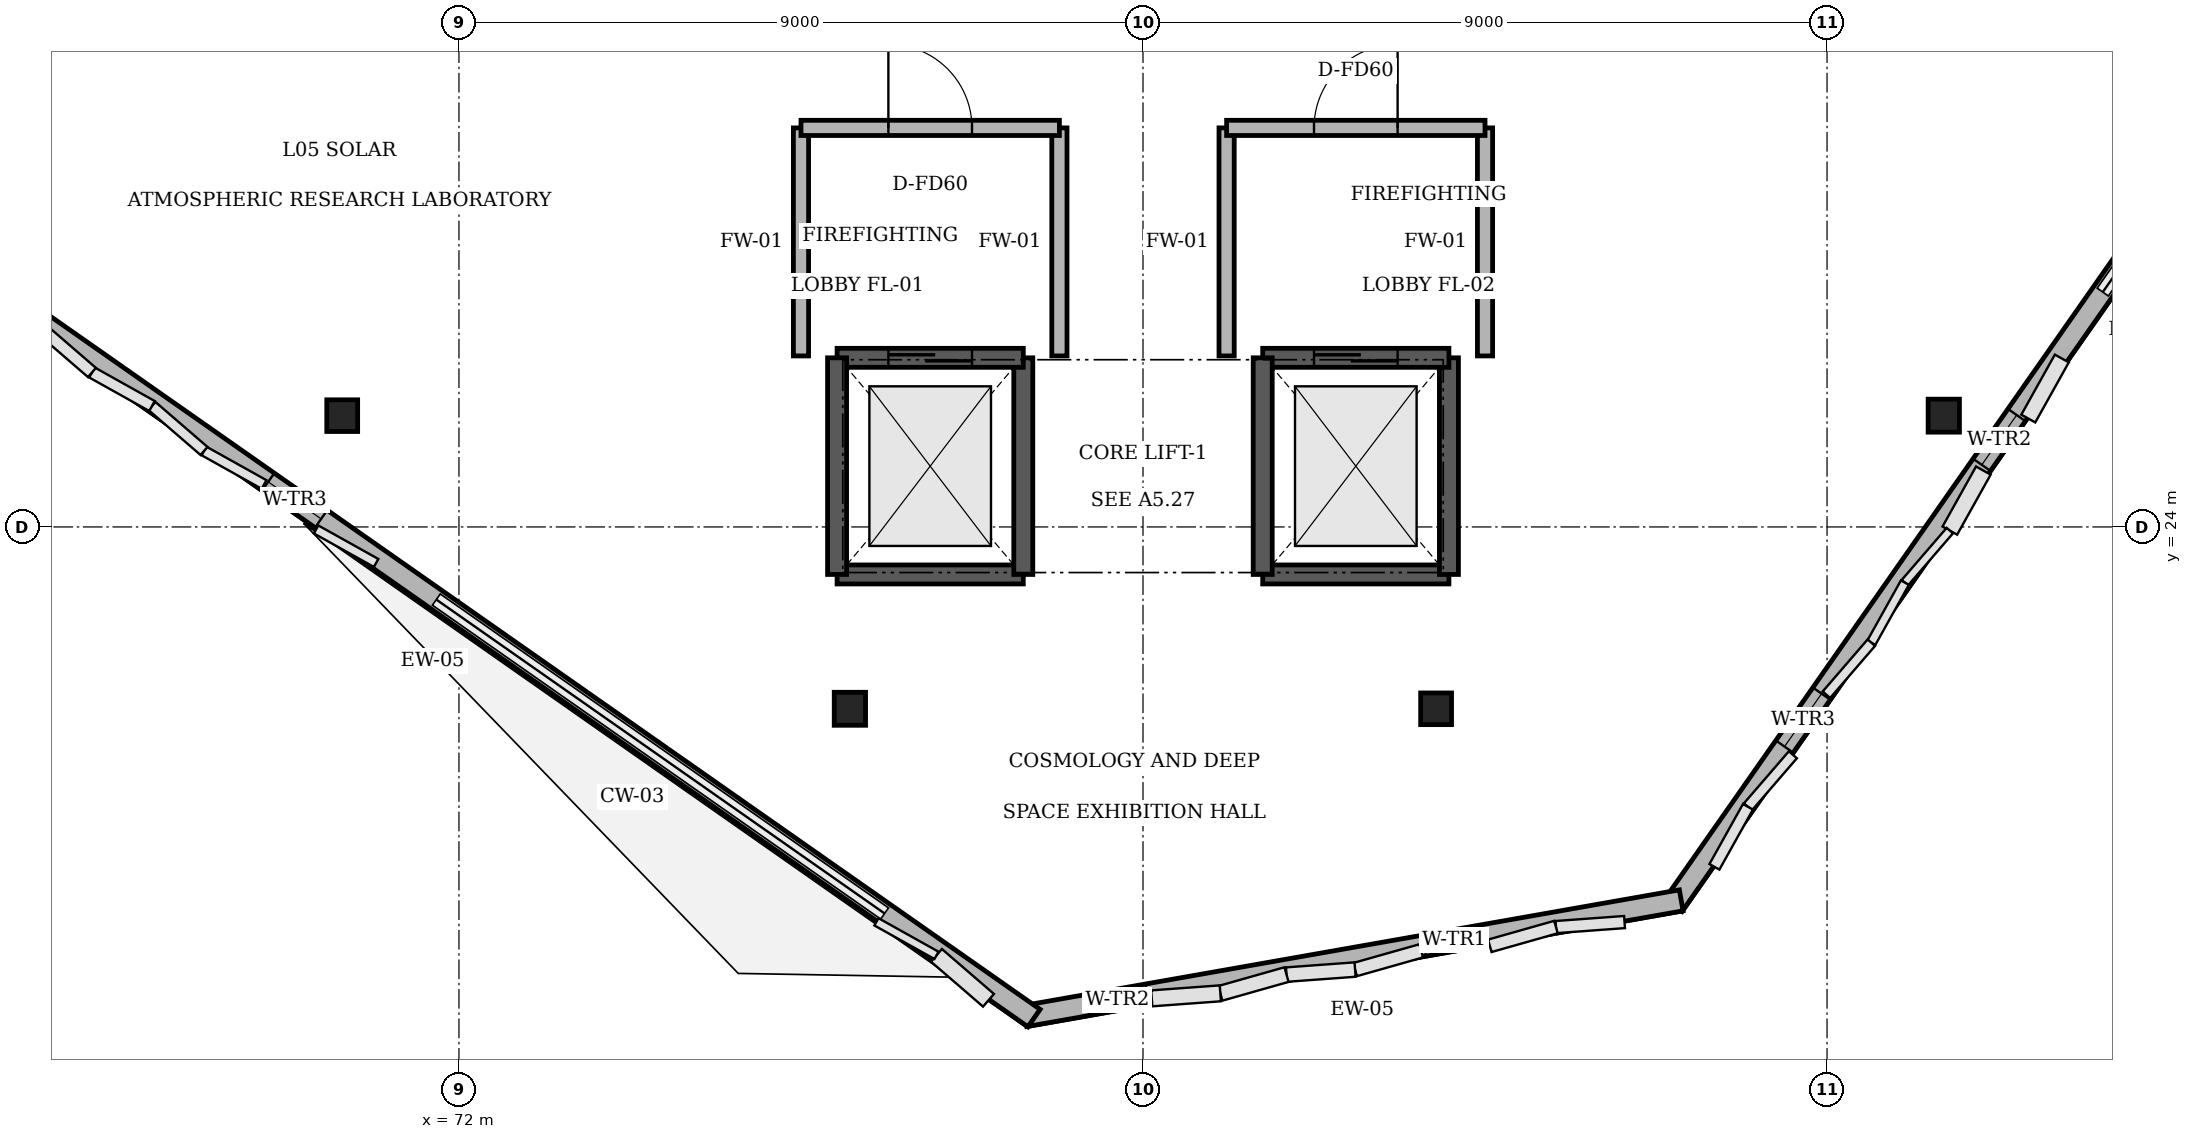
"""IFC4 building model, lengths in metres.
Left out: names, types, materials, properties, quantities, classifications, styles, units other than length and angle.
Written with IfcOpenShell. Run it as: python <this file> out.ifc"""

import sys

from ifc_helpers import new_model, si_unit, direction, frame, frame_2d, origin, origin_2d, place, context, subcontext, project, spatial, rectangle, i_section, extrude, element, fill, save


model = new_model("IFC4")
c1 = context("Model", 3, precision=1e-05, world=origin(), true_north=direction((0.0, 1.0)))
c2 = subcontext(c1, "Body", "Model", "MODEL_VIEW")
j1 = project(units=[si_unit("LENGTHUNIT", "METRE"), si_unit("PLANEANGLEUNIT", "RADIAN")], contexts=[c1])
p1 = place(None, origin())
s1 = spatial("IfcSite", under=j1, at=p1, CompositionType="ELEMENT")
p2 = place(p1, origin())
s2 = spatial("IfcBuilding", under=s1, at=p2, CompositionType="ELEMENT")
p3 = place(p2, frame((0.0, 0.0, 25.2)))
s3 = spatial("IfcBuildingStorey", under=s2, at=p3, CompositionType="ELEMENT", Elevation=25.2)
p4 = place(p3, frame((70.464, 25.464, 0.0), z_axis=(0.0, 0.0, 1.0), x_axis=(1.0, 0.0, 0.0)))
e1 = element("IfcColumn", 1, at=p4, inside=s3, PredefinedType="COLUMN", context=c2, shape_type="SweptSolid", body=[
    extrude(i_section(OverallWidth=0.406, OverallDepth=0.417, WebThickness=0.03, FlangeThickness=0.044, FilletRadius=0.015, at=origin_2d()), origin(), (0.0, 0.0, 1.0), 5.55),
])
p5 = place(p3, frame((77.144, 21.608, 0.0), z_axis=(0.0, 0.0, 1.0), x_axis=(1.0, 0.0, 0.0)))
e2 = element("IfcColumn", 2, at=p5, inside=s3, PredefinedType="COLUMN", context=c2, shape_type="SweptSolid", body=[
    extrude(i_section(OverallWidth=0.412, OverallDepth=0.434, WebThickness=0.036, FlangeThickness=0.044, FilletRadius=0.015, at=origin_2d()), origin(), (0.0, 0.0, 1.0), 5.55),
])
p6 = place(p3, frame((84.856, 21.608, 0.0), z_axis=(0.0, 0.0, 1.0), x_axis=(1.0, 0.0, 0.0)))
e3 = element("IfcColumn", 3, at=p6, inside=s3, PredefinedType="COLUMN", context=c2, shape_type="SweptSolid", body=[
    extrude(i_section(OverallWidth=0.406, OverallDepth=0.417, WebThickness=0.03, FlangeThickness=0.044, FilletRadius=0.015, at=origin_2d()), origin(), (0.0, 0.0, 1.0), 5.55),
])
p7 = place(p3, frame((91.536, 25.464, 0.0), z_axis=(0.0, 0.0, 1.0), x_axis=(1.0, 0.0, 0.0)))
e4 = element("IfcColumn", 4, at=p7, inside=s3, PredefinedType="COLUMN", context=c2, shape_type="SweptSolid", body=[
    extrude(i_section(OverallWidth=0.412, OverallDepth=0.434, WebThickness=0.036, FlangeThickness=0.044, FilletRadius=0.015, at=origin_2d()), origin(), (0.0, 0.0, 1.0), 5.55),
])
p8 = place(p3, frame((99.134, 34.954, 0.0), z_axis=(0.0, 0.0, 1.0), x_axis=(-0.573571854902, -0.819155252235, 0.0)))
e5 = element("IfcWall", 5, at=p8, inside=s3, PredefinedType="SOLIDWALL", context=c2, shape_type="SweptSolid", body=[
    extrude(rectangle(XDim=19.45, YDim=0.28, at=frame_2d((9.725, 0.0))), origin(), (0.0, 0.0, 1.0), 2.45),
])
p9 = place(p8, frame((11.575, 0.0, 0.6)))
e6 = element("IfcOpeningElement", 6, at=p9, cuts=e5, PredefinedType="OPENING", context=c2, shape_type="SweptSolid", body=[
    extrude(rectangle(XDim=0.8, YDim=1.7, at=frame_2d((0.4, 0.85))), frame((0.0, 0.15, 0.0), z_axis=(0.0, -1.0, 0.0), x_axis=(1.0, 0.0, 0.0)), (0.0, 0.0, 1.0), 0.3),
])
p10 = place(p8, frame((16.05, 0.0, 0.6)))
e7 = element("IfcOpeningElement", 7, at=p10, cuts=e5, PredefinedType="OPENING", context=c2, shape_type="SweptSolid", body=[
    extrude(rectangle(XDim=0.85, YDim=1.6, at=frame_2d((0.425, 0.8))), frame((0.0, 0.15, 0.0), z_axis=(0.0, -1.0, 0.0), x_axis=(1.0, 0.0, 0.0)), (0.0, 0.0, 1.0), 0.3),
])
p11 = place(p3, frame((88.081, 19.087, 0.0), z_axis=(0.0, 0.0, 1.0), x_axis=(-0.98480457515, -0.173666199254, 0.0)))
e8 = element("IfcWall", 8, at=p11, inside=s3, PredefinedType="SOLIDWALL", context=c2, shape_type="SweptSolid", body=[
    extrude(rectangle(XDim=8.768, YDim=0.28, at=frame_2d((4.384, 0.0))), origin(), (0.0, 0.0, 1.0), 4.14),
])
p12 = place(p11, frame((2.634, 0.0, 1.05)))
e9 = element("IfcOpeningElement", 9, at=p12, cuts=e8, PredefinedType="OPENING", context=c2, shape_type="SweptSolid", body=[
    extrude(rectangle(XDim=0.8, YDim=1.5, at=frame_2d((0.4, 0.75))), frame((0.0, 0.15, 0.0), z_axis=(0.0, -1.0, 0.0), x_axis=(1.0, 0.0, 0.0)), (0.0, 0.0, 1.0), 0.3),
])
p13 = place(p11, frame((7.134, 0.0, 1.05)))
e10 = element("IfcOpeningElement", 10, at=p13, cuts=e8, PredefinedType="OPENING", context=c2, shape_type="SweptSolid", body=[
    extrude(rectangle(XDim=0.8, YDim=1.7, at=frame_2d((0.4, 0.85))), frame((0.0, 0.15, 0.0), z_axis=(0.0, -1.0, 0.0), x_axis=(1.0, 0.0, 0.0)), (0.0, 0.0, 1.0), 0.3),
])
p14 = place(p3, frame((79.566, 17.538, 0.0), z_axis=(0.0, 0.0, 1.0), x_axis=(-0.819152531377, 0.573575740717, 0.0)))
e11 = element("IfcWall", 11, at=p14, inside=s3, PredefinedType="SOLIDWALL", context=c2, shape_type="SweptSolid", body=[
    extrude(rectangle(XDim=18.35, YDim=0.28, at=frame_2d((9.175, 0.0))), origin(), (0.0, 0.0, 1.0), 2.45),
])
p15 = place(p14, frame((11.45, 0.0, 0.6)))
e12 = element("IfcOpeningElement", 12, at=p15, cuts=e11, PredefinedType="OPENING", context=c2, shape_type="SweptSolid", body=[
    extrude(rectangle(XDim=0.85, YDim=1.6, at=frame_2d((0.425, 0.8))), frame((0.0, 0.15, 0.0), z_axis=(0.0, -1.0, 0.0), x_axis=(1.0, 0.0, 0.0)), (0.0, 0.0, 1.0), 0.3),
])
p16 = place(p14, frame((15.975, 0.0, 0.6)))
e13 = element("IfcOpeningElement", 13, at=p16, cuts=e11, PredefinedType="OPENING", context=c2, shape_type="SweptSolid", body=[
    extrude(rectangle(XDim=0.8, YDim=1.5, at=frame_2d((0.4, 0.75))), frame((0.0, 0.15, 0.0), z_axis=(0.0, -1.0, 0.0), x_axis=(1.0, 0.0, 0.0)), (0.0, 0.0, 1.0), 0.3),
])
p17 = place(p3, frame((76.975, 23.375, 0.0), z_axis=(0.0, 0.0, 1.0), x_axis=(1.0, 0.0, 0.0)))
e14 = element("IfcWall", 14, at=p17, inside=s3, PredefinedType="SOLIDWALL", context=c2, shape_type="SweptSolid", body=[
    extrude(rectangle(XDim=2.45, YDim=0.25, at=frame_2d((1.225, 0.0))), origin(), (0.0, 0.0, 1.0), 4.8),
])
p18 = place(p3, frame((79.425, 23.375, 0.0), z_axis=(0.0, 0.0, 1.0), x_axis=(0.0, 1.0, 0.0)))
e15 = element("IfcWall", 15, at=p18, inside=s3, PredefinedType="SOLIDWALL", context=c2, shape_type="SweptSolid", body=[
    extrude(rectangle(XDim=2.85, YDim=0.25, at=frame_2d((1.425, 0.0))), origin(), (0.0, 0.0, 1.0), 4.8),
])
p19 = place(p3, frame((79.425, 26.225, 0.0), z_axis=(0.0, 0.0, 1.0), x_axis=(-1.0, 0.0, 0.0)))
e16 = element("IfcWall", 16, at=p19, inside=s3, PredefinedType="SOLIDWALL", context=c2, shape_type="SweptSolid", body=[
    extrude(rectangle(XDim=2.45, YDim=0.25, at=frame_2d((1.225, 0.0))), origin(), (0.0, 0.0, 1.0), 4.8),
])
p20 = place(p19, frame((0.675, 0.0, 0.0)))
e17 = element("IfcOpeningElement", 17, at=p20, cuts=e16, PredefinedType="OPENING", context=c2, shape_type="SweptSolid", body=[
    extrude(rectangle(XDim=1.1, YDim=2.2, at=frame_2d((0.55, 1.1))), frame((0.0, 0.135, 0.0), z_axis=(0.0, -1.0, 0.0), x_axis=(1.0, 0.0, 0.0)), (0.0, 0.0, 1.0), 0.27),
])
p21 = place(p3, frame((76.975, 26.225, 0.0), z_axis=(0.0, 0.0, 1.0), x_axis=(0.0, -1.0, 0.0)))
e18 = element("IfcWall", 18, at=p21, inside=s3, PredefinedType="SOLIDWALL", context=c2, shape_type="SweptSolid", body=[
    extrude(rectangle(XDim=2.85, YDim=0.25, at=frame_2d((1.425, 0.0))), origin(), (0.0, 0.0, 1.0), 4.8),
])
for number, where, z_axis, x_axis in (
    (19, (76.5, 26.25, 0.0), (0.0, 0.0, 1.0), (0.0, 1.0, 0.0)),
    (20, (79.9, 26.25, 0.0), (0.0, 0.0, 1.0), (0.0, 1.0, 0.0)),
):
    element("IfcWall", number, at=place(p3, frame(where, z_axis=z_axis, x_axis=x_axis)), inside=s3, PredefinedType="SOLIDWALL", context=c2, shape_type="SweptSolid", body=[
        extrude(rectangle(XDim=3.0, YDim=0.2, at=frame_2d((1.5, 0.0))), origin(), (0.0, 0.0, 1.0), 4.01),
    ])
p22 = place(p3, frame((76.5, 29.25, 0.0), z_axis=(0.0, 0.0, 1.0), x_axis=(1.0, 0.0, 0.0)))
e21 = element("IfcWall", 21, at=p22, inside=s3, PredefinedType="SOLIDWALL", context=c2, shape_type="SweptSolid", body=[
    extrude(rectangle(XDim=3.4, YDim=0.2, at=frame_2d((1.7, 0.0))), origin(), (0.0, 0.0, 1.0), 4.01),
])
p23 = place(p22, frame((1.15, 0.0, 0.0)))
e22 = element("IfcOpeningElement", 22, at=p23, cuts=e21, PredefinedType="OPENING", context=c2, shape_type="SweptSolid", body=[
    extrude(rectangle(XDim=1.1, YDim=2.2, at=frame_2d((0.55, 1.1))), frame((0.0, 0.11, 0.0), z_axis=(0.0, -1.0, 0.0), x_axis=(1.0, 0.0, 0.0)), (0.0, 0.0, 1.0), 0.22),
])
p24 = place(p3, frame((82.575, 23.375, 0.0), z_axis=(0.0, 0.0, 1.0), x_axis=(1.0, 0.0, 0.0)))
e23 = element("IfcWall", 23, at=p24, inside=s3, PredefinedType="SOLIDWALL", context=c2, shape_type="SweptSolid", body=[
    extrude(rectangle(XDim=2.45, YDim=0.25, at=frame_2d((1.225, 0.0))), origin(), (0.0, 0.0, 1.0), 4.8),
])
p25 = place(p3, frame((85.025, 23.375, 0.0), z_axis=(0.0, 0.0, 1.0), x_axis=(0.0, 1.0, 0.0)))
e24 = element("IfcWall", 24, at=p25, inside=s3, PredefinedType="SOLIDWALL", context=c2, shape_type="SweptSolid", body=[
    extrude(rectangle(XDim=2.85, YDim=0.25, at=frame_2d((1.425, 0.0))), origin(), (0.0, 0.0, 1.0), 4.8),
])
p26 = place(p3, frame((85.025, 26.225, 0.0), z_axis=(0.0, 0.0, 1.0), x_axis=(-1.0, 0.0, 0.0)))
e25 = element("IfcWall", 25, at=p26, inside=s3, PredefinedType="SOLIDWALL", context=c2, shape_type="SweptSolid", body=[
    extrude(rectangle(XDim=2.45, YDim=0.25, at=frame_2d((1.225, 0.0))), origin(), (0.0, 0.0, 1.0), 4.8),
])
p27 = place(p26, frame((0.675, 0.0, 0.0)))
e26 = element("IfcOpeningElement", 26, at=p27, cuts=e25, PredefinedType="OPENING", context=c2, shape_type="SweptSolid", body=[
    extrude(rectangle(XDim=1.1, YDim=2.2, at=frame_2d((0.55, 1.1))), frame((0.0, 0.135, 0.0), z_axis=(0.0, -1.0, 0.0), x_axis=(1.0, 0.0, 0.0)), (0.0, 0.0, 1.0), 0.27),
])
p28 = place(p3, frame((82.575, 26.225, 0.0), z_axis=(0.0, 0.0, 1.0), x_axis=(0.0, -1.0, 0.0)))
e27 = element("IfcWall", 27, at=p28, inside=s3, PredefinedType="SOLIDWALL", context=c2, shape_type="SweptSolid", body=[
    extrude(rectangle(XDim=2.85, YDim=0.25, at=frame_2d((1.425, 0.0))), origin(), (0.0, 0.0, 1.0), 4.8),
])
for number, where, z_axis, x_axis in (
    (28, (82.1, 26.25, 0.0), (0.0, 0.0, 1.0), (0.0, 1.0, 0.0)),
    (29, (85.5, 26.25, 0.0), (0.0, 0.0, 1.0), (0.0, 1.0, 0.0)),
):
    element("IfcWall", number, at=place(p3, frame(where, z_axis=z_axis, x_axis=x_axis)), inside=s3, PredefinedType="SOLIDWALL", context=c2, shape_type="SweptSolid", body=[
        extrude(rectangle(XDim=3.0, YDim=0.2, at=frame_2d((1.5, 0.0))), origin(), (0.0, 0.0, 1.0), 4.01),
    ])
p29 = place(p3, frame((82.1, 29.25, 0.0), z_axis=(0.0, 0.0, 1.0), x_axis=(1.0, 0.0, 0.0)))
e30 = element("IfcWall", 30, at=p29, inside=s3, PredefinedType="SOLIDWALL", context=c2, shape_type="SweptSolid", body=[
    extrude(rectangle(XDim=3.4, YDim=0.2, at=frame_2d((1.7, 0.0))), origin(), (0.0, 0.0, 1.0), 4.01),
])
p30 = place(p29, frame((1.15, 0.0, 0.0)))
e31 = element("IfcOpeningElement", 31, at=p30, cuts=e30, PredefinedType="OPENING", context=c2, shape_type="SweptSolid", body=[
    extrude(rectangle(XDim=1.1, YDim=2.2, at=frame_2d((0.55, 1.1))), frame((0.0, 0.11, 0.0), z_axis=(0.0, -1.0, 0.0), x_axis=(1.0, 0.0, 0.0)), (0.0, 0.0, 1.0), 0.22),
])
p31 = place(p9, origin())
e32 = element("IfcWindow", 32, at=p31, inside=s3, PartitioningType="SINGLE_PANEL", PredefinedType="WINDOW", context=c2, shape_type="SweptSolid", body=[
    extrude(rectangle(XDim=0.8, YDim=1.7, at=frame_2d((0.4, 0.85))), frame((0.0, 0.03, 0.0), z_axis=(0.0, -1.0, 0.0), x_axis=(1.0, 0.0, 0.0)), (0.0, 0.0, 1.0), 0.06),
])
fill(e6, e32)
p32 = place(p10, origin())
e33 = element("IfcWindow", 33, at=p32, inside=s3, PartitioningType="SINGLE_PANEL", PredefinedType="WINDOW", context=c2, shape_type="SweptSolid", body=[
    extrude(rectangle(XDim=0.85, YDim=1.6, at=frame_2d((0.425, 0.8))), frame((0.0, 0.03, 0.0), z_axis=(0.0, -1.0, 0.0), x_axis=(1.0, 0.0, 0.0)), (0.0, 0.0, 1.0), 0.06),
])
fill(e7, e33)
p33 = place(p12, origin())
e34 = element("IfcWindow", 34, at=p33, inside=s3, PartitioningType="SINGLE_PANEL", PredefinedType="WINDOW", context=c2, shape_type="SweptSolid", body=[
    extrude(rectangle(XDim=0.8, YDim=1.5, at=frame_2d((0.4, 0.75))), frame((0.0, 0.03, 0.0), z_axis=(0.0, -1.0, 0.0), x_axis=(1.0, 0.0, 0.0)), (0.0, 0.0, 1.0), 0.06),
])
fill(e9, e34)
p34 = place(p13, origin())
e35 = element("IfcWindow", 35, at=p34, inside=s3, PartitioningType="SINGLE_PANEL", PredefinedType="WINDOW", context=c2, shape_type="SweptSolid", body=[
    extrude(rectangle(XDim=0.8, YDim=1.7, at=frame_2d((0.4, 0.85))), frame((0.0, 0.03, 0.0), z_axis=(0.0, -1.0, 0.0), x_axis=(1.0, 0.0, 0.0)), (0.0, 0.0, 1.0), 0.06),
])
fill(e10, e35)
p35 = place(p15, origin())
e36 = element("IfcWindow", 36, at=p35, inside=s3, PartitioningType="SINGLE_PANEL", PredefinedType="WINDOW", context=c2, shape_type="SweptSolid", body=[
    extrude(rectangle(XDim=0.85, YDim=1.6, at=frame_2d((0.425, 0.8))), frame((0.0, 0.03, 0.0), z_axis=(0.0, -1.0, 0.0), x_axis=(1.0, 0.0, 0.0)), (0.0, 0.0, 1.0), 0.06),
])
fill(e12, e36)
p36 = place(p20, origin())
e37 = element("IfcDoor", 37, at=p36, inside=s3, OperationType="SLIDING_TO_LEFT", PredefinedType="DOOR", context=c2, shape_type="SweptSolid", body=[
    extrude(rectangle(XDim=1.1, YDim=2.2, at=frame_2d((0.55, 1.1))), frame((0.0, 0.025, 0.0), z_axis=(0.0, -1.0, 0.0), x_axis=(1.0, 0.0, 0.0)), (0.0, 0.0, 1.0), 0.05),
])
fill(e17, e37)
p37 = place(p23, origin())
e38 = element("IfcDoor", 38, at=p37, inside=s3, OperationType="SINGLE_SWING_LEFT", PredefinedType="DOOR", context=c2, shape_type="SweptSolid", body=[
    extrude(rectangle(XDim=1.1, YDim=2.2, at=frame_2d((0.55, 1.1))), frame((0.0, 0.025, 0.0), z_axis=(0.0, -1.0, 0.0), x_axis=(1.0, 0.0, 0.0)), (0.0, 0.0, 1.0), 0.05),
])
fill(e22, e38)
p38 = place(p27, origin())
e39 = element("IfcDoor", 39, at=p38, inside=s3, OperationType="SLIDING_TO_LEFT", PredefinedType="DOOR", context=c2, shape_type="SweptSolid", body=[
    extrude(rectangle(XDim=1.1, YDim=2.2, at=frame_2d((0.55, 1.1))), frame((0.0, 0.025, 0.0), z_axis=(0.0, -1.0, 0.0), x_axis=(1.0, 0.0, 0.0)), (0.0, 0.0, 1.0), 0.05),
])
fill(e26, e39)
p39 = place(p30, origin())
e40 = element("IfcDoor", 40, at=p39, inside=s3, OperationType="SINGLE_SWING_RIGHT", PredefinedType="DOOR", context=c2, shape_type="SweptSolid", body=[
    extrude(rectangle(XDim=1.1, YDim=2.2, at=frame_2d((0.55, 1.1))), frame((0.0, 0.025, 0.0), z_axis=(0.0, -1.0, 0.0), x_axis=(1.0, 0.0, 0.0)), (0.0, 0.0, 1.0), 0.05),
])
fill(e31, e40)
save(model, sys.argv[1])
